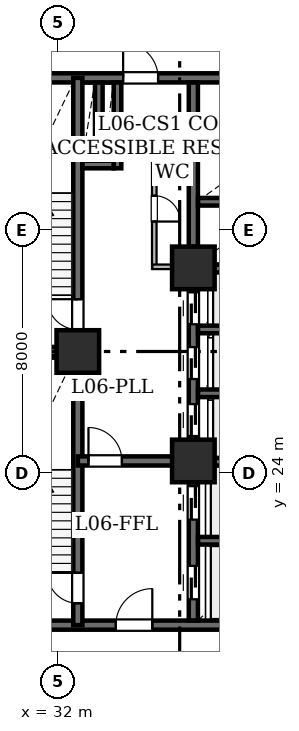
"""IFC4 building model, lengths in metres.
Left out: names, types, materials, properties, quantities, classifications, styles, units other than length and angle.
Written with IfcOpenShell. Run it as: python <this file> out.ifc"""

import sys

from ifc_helpers import new_model, si_unit, direction, frame, frame_2d, origin, origin_2d, place, context, subcontext, project, spatial, rectangle, hollow_rectangle, extrude, element, fill, save


model = new_model("IFC4")
c1 = context("Model", 3, precision=1e-05, world=origin(), true_north=direction((0.0, 1.0)))
c2 = subcontext(c1, "Body", "Model", "MODEL_VIEW")
j1 = project(units=[si_unit("LENGTHUNIT", "METRE"), si_unit("PLANEANGLEUNIT", "RADIAN")], contexts=[c1])
p1 = place(None, origin())
s1 = spatial("IfcSite", under=j1, at=p1, CompositionType="ELEMENT")
p2 = place(p1, origin())
s2 = spatial("IfcBuilding", under=s1, at=p2, CompositionType="ELEMENT")
p3 = place(p2, frame((0.0, 0.0, 28.8)))
s3 = spatial("IfcBuildingStorey", under=s2, at=p3, CompositionType="ELEMENT", Elevation=28.8)
for number, where, z_axis, x_axis in (
    (1, (32.65, 28.0, 0.0), (0.0, 0.0, 1.0), (1.0, 0.0, 0.0)),
    (2, (36.45, 24.4, 0.0), (0.0, 0.0, 1.0), (1.0, 0.0, 0.0)),
    (3, (36.45, 30.75, 0.0), (0.0, 0.0, 1.0), (1.0, 0.0, 0.0)),
):
    element("IfcColumn", number, at=place(p3, frame(where, z_axis=z_axis, x_axis=x_axis)), inside=s3, PredefinedType="COLUMN", context=c2, shape_type="SweptSolid", body=[
        extrude(hollow_rectangle(XDim=1.4, YDim=1.4, WallThickness=0.07, at=origin_2d()), origin(), (0.0, 0.0, 1.0), 4.5),
    ])
p4 = place(p3, frame((29.0, 19.0, 0.0), z_axis=(0.0, 0.0, 1.0), x_axis=(1.0, 0.0, 0.0)))
e4 = element("IfcWall", 4, at=p4, inside=s3, PredefinedType="SHEAR", context=c2, shape_type="SweptSolid", body=[
    extrude(rectangle(XDim=10.4, YDim=0.3, at=frame_2d((5.2, 0.0))), origin(), (0.0, 0.0, 1.0), 4.08),
])
p5 = place(p4, frame((4.9, 0.0, 0.0)))
e5 = element("IfcOpeningElement", 5, at=p5, cuts=e4, PredefinedType="OPENING", context=c2, shape_type="SweptSolid", body=[
    extrude(rectangle(XDim=1.2, YDim=2.15, at=frame_2d((0.6, 1.075))), frame((0.0, 0.16, 0.0), z_axis=(0.0, -1.0, 0.0), x_axis=(1.0, 0.0, 0.0)), (0.0, 0.0, 1.0), 0.32),
])
p6 = place(p3, frame((29.0, 37.0, 0.0), z_axis=(0.0, 0.0, 1.0), x_axis=(1.0, 0.0, 0.0)))
e6 = element("IfcWall", 6, at=p6, inside=s3, PredefinedType="SHEAR", context=c2, shape_type="SweptSolid", body=[
    extrude(rectangle(XDim=10.4, YDim=0.3, at=frame_2d((5.2, 0.0))), origin(), (0.0, 0.0, 1.0), 4.08),
])
p7 = place(p6, frame((5.14, 0.0, 0.0)))
e7 = element("IfcOpeningElement", 7, at=p7, cuts=e6, PredefinedType="OPENING", context=c2, shape_type="SweptSolid", body=[
    extrude(rectangle(XDim=1.15, YDim=2.2, at=frame_2d((0.575, 1.1))), frame((0.0, 0.16, 0.0), z_axis=(0.0, -1.0, 0.0), x_axis=(1.0, 0.0, 0.0)), (0.0, 0.0, 1.0), 0.32),
])
p8 = place(p3, frame((32.65, 19.0, 0.0), z_axis=(0.0, 0.0, 1.0), x_axis=(0.0, 1.0, 0.0)))
e8 = element("IfcWall", 8, at=p8, inside=s3, PredefinedType="SHEAR", context=c2, shape_type="SweptSolid", body=[
    extrude(rectangle(XDim=9.0, YDim=0.3, at=frame_2d((4.5, 0.0))), origin(), (0.0, 0.0, 1.0), 4.08),
])
p9 = place(p8, frame((0.72, 0.0, 0.0)))
e9 = element("IfcOpeningElement", 9, at=p9, cuts=e8, PredefinedType="OPENING", context=c2, shape_type="SweptSolid", body=[
    extrude(rectangle(XDim=1.0, YDim=2.15, at=frame_2d((0.5, 1.075))), frame((0.0, 0.16, 0.0), z_axis=(0.0, -1.0, 0.0), x_axis=(1.0, 0.0, 0.0)), (0.0, 0.0, 1.0), 0.32),
])
p10 = place(p3, frame((32.65, 28.0, 0.0), z_axis=(0.0, 0.0, 1.0), x_axis=(0.0, 1.0, 0.0)))
e10 = element("IfcWall", 10, at=p10, inside=s3, PredefinedType="SHEAR", context=c2, shape_type="SweptSolid", body=[
    extrude(rectangle(XDim=9.0, YDim=0.3, at=frame_2d((4.5, 0.0))), origin(), (0.0, 0.0, 1.0), 4.08),
])
p11 = place(p10, frame((0.72, 0.0, 0.0)))
e11 = element("IfcOpeningElement", 11, at=p11, cuts=e10, PredefinedType="OPENING", context=c2, shape_type="SweptSolid", body=[
    extrude(rectangle(XDim=1.0, YDim=2.15, at=frame_2d((0.5, 1.075))), frame((0.0, 0.16, 0.0), z_axis=(0.0, -1.0, 0.0), x_axis=(1.0, 0.0, 0.0)), (0.0, 0.0, 1.0), 0.32),
])
p12 = place(p3, frame((29.0, 28.0, 0.0), z_axis=(0.0, 0.0, 1.0), x_axis=(1.0, 0.0, 0.0)))
e12 = element("IfcWall", 12, at=p12, inside=s3, PredefinedType="SHEAR", context=c2, shape_type="SweptSolid", body=[
    extrude(rectangle(XDim=3.65, YDim=0.3, at=frame_2d((1.825, 0.0))), origin(), (0.0, 0.0, 1.0), 4.08),
])
p13 = place(p3, frame((32.65, 24.4, 0.0), z_axis=(0.0, 0.0, 1.0), x_axis=(1.0, 0.0, 0.0)))
e13 = element("IfcWall", 13, at=p13, inside=s3, PredefinedType="SHEAR", context=c2, shape_type="SweptSolid", body=[
    extrude(rectangle(XDim=3.8, YDim=0.3, at=frame_2d((1.9, 0.0))), origin(), (0.0, 0.0, 1.0), 4.08),
])
p14 = place(p13, frame((0.35, 0.0, 0.0)))
e14 = element("IfcOpeningElement", 14, at=p14, cuts=e13, PredefinedType="OPENING", context=c2, shape_type="SweptSolid", body=[
    extrude(rectangle(XDim=1.1, YDim=2.15, at=frame_2d((0.55, 1.075))), frame((0.0, 0.16, 0.0), z_axis=(0.0, -1.0, 0.0), x_axis=(1.0, 0.0, 0.0)), (0.0, 0.0, 1.0), 0.32),
])
p15 = place(p3, frame((36.45, 19.154, 0.0), z_axis=(0.0, 0.0, 1.0), x_axis=(0.0, 1.0, 0.0)))
e15 = element("IfcWall", 15, at=p15, inside=s3, PredefinedType="SHEAR", context=c2, shape_type="SweptSolid", body=[
    extrude(rectangle(XDim=4.546, YDim=0.3, at=frame_2d((2.273, 0.0))), origin(), (0.0, 0.0, 1.0), 4.08),
])
p16 = place(p15, frame((0.696, 0.0, 0.0)))
e16 = element("IfcOpeningElement", 16, at=p16, cuts=e15, PredefinedType="OPENING", context=c2, shape_type="SweptSolid", body=[
    extrude(rectangle(XDim=1.1, YDim=2.15, at=frame_2d((0.55, 1.075))), frame((0.0, 0.16, 0.0), z_axis=(0.0, -1.0, 0.0), x_axis=(1.0, 0.0, 0.0)), (0.0, 0.0, 1.0), 0.32),
])
p17 = place(p15, frame((3.316, 0.0, 0.0)))
e17 = element("IfcOpeningElement", 17, at=p17, cuts=e15, PredefinedType="OPENING", context=c2, shape_type="SweptSolid", body=[
    extrude(rectangle(XDim=1.1, YDim=2.15, at=frame_2d((0.55, 1.075))), frame((0.0, 0.16, 0.0), z_axis=(0.0, -1.0, 0.0), x_axis=(1.0, 0.0, 0.0)), (0.0, 0.0, 1.0), 0.32),
])
p18 = place(p3, frame((36.45, 25.1, 0.0), z_axis=(0.0, 0.0, 1.0), x_axis=(0.0, 1.0, 0.0)))
e18 = element("IfcWall", 18, at=p18, inside=s3, PredefinedType="SHEAR", context=c2, shape_type="SweptSolid", body=[
    extrude(rectangle(XDim=4.95, YDim=0.3, at=frame_2d((2.475, 0.0))), origin(), (0.0, 0.0, 1.0), 4.08),
])
p19 = place(p18, frame((0.12, 0.0, 0.0)))
e19 = element("IfcOpeningElement", 19, at=p19, cuts=e18, PredefinedType="OPENING", context=c2, shape_type="SweptSolid", body=[
    extrude(rectangle(XDim=1.05, YDim=2.15, at=frame_2d((0.525, 1.075))), frame((0.0, 0.16, 0.0), z_axis=(0.0, -1.0, 0.0), x_axis=(1.0, 0.0, 0.0)), (0.0, 0.0, 1.0), 0.32),
])
p20 = place(p18, frame((1.995, 0.0, 0.0)))
e20 = element("IfcOpeningElement", 20, at=p20, cuts=e18, PredefinedType="OPENING", context=c2, shape_type="SweptSolid", body=[
    extrude(rectangle(XDim=1.05, YDim=2.15, at=frame_2d((0.525, 1.075))), frame((0.0, 0.16, 0.0), z_axis=(0.0, -1.0, 0.0), x_axis=(1.0, 0.0, 0.0)), (0.0, 0.0, 1.0), 0.32),
])
p21 = place(p18, frame((3.795, 0.0, 0.0)))
e21 = element("IfcOpeningElement", 21, at=p21, cuts=e18, PredefinedType="OPENING", context=c2, shape_type="SweptSolid", body=[
    extrude(rectangle(XDim=1.05, YDim=2.15, at=frame_2d((0.525, 1.075))), frame((0.0, 0.16, 0.0), z_axis=(0.0, -1.0, 0.0), x_axis=(1.0, 0.0, 0.0)), (0.0, 0.0, 1.0), 0.32),
])
p22 = place(p3, frame((36.45, 31.45, 0.0), z_axis=(0.0, 0.0, 1.0), x_axis=(0.0, 1.0, 0.0)))
e22 = element("IfcWall", 22, at=p22, inside=s3, PredefinedType="SHEAR", context=c2, shape_type="SweptSolid", body=[
    extrude(rectangle(XDim=5.396, YDim=0.3, at=frame_2d((2.698, 0.0))), origin(), (0.0, 0.0, 1.0), 4.08),
])
for number, where, z_axis, x_axis in (
    (23, (36.604, 21.775, 0.0), (0.0, 0.0, 1.0), (1.0, 0.0, 0.0)),
    (24, (36.604, 24.375, 0.0), (0.0, 0.0, 1.0), (1.0, 0.0, 0.0)),
    (25, (36.604, 26.625, 0.0), (0.0, 0.0, 1.0), (1.0, 0.0, 0.0)),
    (26, (36.604, 28.725, 0.0), (0.0, 0.0, 1.0), (1.0, 0.0, 0.0)),
    (27, (36.604, 30.725, 0.0), (0.0, 0.0, 1.0), (1.0, 0.0, 0.0)),
    (28, (36.604, 32.925, 0.0), (0.0, 0.0, 1.0), (1.0, 0.0, 0.0)),
    (29, (36.604, 34.975, 0.0), (0.0, 0.0, 1.0), (1.0, 0.0, 0.0)),
):
    element("IfcWall", number, at=place(p3, frame(where, z_axis=z_axis, x_axis=x_axis)), inside=s3, PredefinedType="SHEAR", context=c2, shape_type="SweptSolid", body=[
        extrude(rectangle(XDim=2.642, YDim=0.25, at=frame_2d((1.321, 0.0))), origin(), (0.0, 0.0, 1.0), 4.08),
    ])
p23 = place(p3, frame((33.955, 34.025, 0.0), z_axis=(0.0, 0.0, 1.0), x_axis=(0.0, 1.0, 0.0)))
e30 = element("IfcWall", 30, at=p23, inside=s3, PredefinedType="SHEAR", context=c2, shape_type="SweptSolid", body=[
    extrude(rectangle(XDim=2.821, YDim=0.25, at=frame_2d((1.411, 0.0))), origin(), (0.0, 0.0, 1.0), 4.08),
])
p24 = place(p3, frame((32.804, 34.15, 0.0), z_axis=(0.0, 0.0, 1.0), x_axis=(1.0, 0.0, 0.0)))
e31 = element("IfcWall", 31, at=p24, inside=s3, PredefinedType="SHEAR", context=c2, shape_type="SweptSolid", body=[
    extrude(rectangle(XDim=1.022, YDim=0.25, at=frame_2d((0.511, 0.0))), origin(), (0.0, 0.0, 1.0), 4.08),
])
p25 = place(p3, frame((33.34, 34.279, 0.0), z_axis=(0.0, 0.0, 1.0), x_axis=(0.0, 1.0, 0.0)))
e32 = element("IfcWall", 32, at=p25, inside=s3, PredefinedType="SHEAR", context=c2, shape_type="SweptSolid", body=[
    extrude(rectangle(XDim=2.567, YDim=0.25, at=frame_2d((1.283, 0.0))), origin(), (0.0, 0.0, 1.0), 4.08),
])
p26 = place(p3, frame((36.306, 34.615, 0.0), z_axis=(0.0, 0.0, 1.0), x_axis=(-1.0, 0.0, 0.0)))
e33 = element("IfcWall", 33, at=p26, inside=s3, PredefinedType="STANDARD", context=c2, shape_type="SweptSolid", body=[
    extrude(rectangle(XDim=1.206, YDim=0.15, at=frame_2d((0.603, 0.0))), origin(), (0.0, 0.0, 1.0), 4.08),
])
p27 = place(p3, frame((35.165, 34.678, 0.0), z_axis=(0.0, 0.0, 1.0), x_axis=(0.0, -1.0, 0.0)))
e34 = element("IfcWall", 34, at=p27, inside=s3, PredefinedType="STANDARD", context=c2, shape_type="SweptSolid", body=[
    extrude(rectangle(XDim=3.958, YDim=0.15, at=frame_2d((1.979, 0.0))), origin(), (0.0, 0.0, 1.0), 4.08),
])
p28 = place(p27, frame((1.554, 0.0, 0.0)))
e35 = element("IfcOpeningElement", 35, at=p28, cuts=e34, PredefinedType="OPENING", context=c2, shape_type="SweptSolid", body=[
    extrude(rectangle(XDim=0.85, YDim=2.1, at=frame_2d((0.425, 1.05))), frame((0.0, 0.085, 0.0), z_axis=(0.0, -1.0, 0.0), x_axis=(1.0, 0.0, 0.0)), (0.0, 0.0, 1.0), 0.17),
])
p29 = place(p3, frame((35.102, 30.785, 0.0), z_axis=(0.0, 0.0, 1.0), x_axis=(1.0, 0.0, 0.0)))
e36 = element("IfcWall", 36, at=p29, inside=s3, PredefinedType="STANDARD", context=c2, shape_type="SweptSolid", body=[
    extrude(rectangle(XDim=1.198, YDim=0.15, at=frame_2d((0.599, 0.0))), origin(), (0.0, 0.0, 1.0), 4.08),
])
p30 = place(p9, origin())
e37 = element("IfcDoor", 37, at=p30, inside=s3, OperationType="SINGLE_SWING_RIGHT", PredefinedType="DOOR", context=c2, shape_type="SweptSolid", body=[
    extrude(rectangle(XDim=1.0, YDim=2.15, at=frame_2d((0.5, 1.075))), frame((0.0, 0.025, 0.0), z_axis=(0.0, -1.0, 0.0), x_axis=(1.0, 0.0, 0.0)), (0.0, 0.0, 1.0), 0.05),
])
fill(e9, e37)
p31 = place(p11, origin())
e38 = element("IfcDoor", 38, at=p31, inside=s3, OperationType="SINGLE_SWING_RIGHT", PredefinedType="DOOR", context=c2, shape_type="SweptSolid", body=[
    extrude(rectangle(XDim=1.0, YDim=2.15, at=frame_2d((0.5, 1.075))), frame((0.0, 0.025, 0.0), z_axis=(0.0, -1.0, 0.0), x_axis=(1.0, 0.0, 0.0)), (0.0, 0.0, 1.0), 0.05),
])
fill(e11, e38)
p32 = place(p14, origin())
e39 = element("IfcDoor", 39, at=p32, inside=s3, OperationType="SINGLE_SWING_LEFT", PredefinedType="DOOR", context=c2, shape_type="SweptSolid", body=[
    extrude(rectangle(XDim=1.1, YDim=2.15, at=frame_2d((0.55, 1.075))), frame((0.0, 0.025, 0.0), z_axis=(0.0, -1.0, 0.0), x_axis=(1.0, 0.0, 0.0)), (0.0, 0.0, 1.0), 0.05),
])
fill(e14, e39)
p33 = place(p5, origin())
e40 = element("IfcDoor", 40, at=p33, inside=s3, OperationType="SINGLE_SWING_RIGHT", PredefinedType="DOOR", context=c2, shape_type="SweptSolid", body=[
    extrude(rectangle(XDim=1.2, YDim=2.15, at=frame_2d((0.6, 1.075))), frame((0.0, 0.025, 0.0), z_axis=(0.0, -1.0, 0.0), x_axis=(1.0, 0.0, 0.0)), (0.0, 0.0, 1.0), 0.05),
])
fill(e5, e40)
p34 = place(p7, origin())
e41 = element("IfcDoor", 41, at=p34, inside=s3, OperationType="SINGLE_SWING_LEFT", PredefinedType="DOOR", context=c2, shape_type="SweptSolid", body=[
    extrude(rectangle(XDim=1.15, YDim=2.2, at=frame_2d((0.575, 1.1))), frame((0.0, 0.025, 0.0), z_axis=(0.0, -1.0, 0.0), x_axis=(1.0, 0.0, 0.0)), (0.0, 0.0, 1.0), 0.05),
])
fill(e7, e41)
p35 = place(p16, origin())
e42 = element("IfcDoor", 42, at=p35, inside=s3, OperationType="SLIDING_TO_LEFT", PredefinedType="DOOR", context=c2, shape_type="SweptSolid", body=[
    extrude(rectangle(XDim=1.1, YDim=2.15, at=frame_2d((0.55, 1.075))), frame((0.0, 0.025, 0.0), z_axis=(0.0, -1.0, 0.0), x_axis=(1.0, 0.0, 0.0)), (0.0, 0.0, 1.0), 0.05),
])
fill(e16, e42)
p36 = place(p17, origin())
e43 = element("IfcDoor", 43, at=p36, inside=s3, OperationType="SLIDING_TO_LEFT", PredefinedType="DOOR", context=c2, shape_type="SweptSolid", body=[
    extrude(rectangle(XDim=1.1, YDim=2.15, at=frame_2d((0.55, 1.075))), frame((0.0, 0.025, 0.0), z_axis=(0.0, -1.0, 0.0), x_axis=(1.0, 0.0, 0.0)), (0.0, 0.0, 1.0), 0.05),
])
fill(e17, e43)
p37 = place(p19, origin())
e44 = element("IfcDoor", 44, at=p37, inside=s3, OperationType="SLIDING_TO_LEFT", PredefinedType="DOOR", context=c2, shape_type="SweptSolid", body=[
    extrude(rectangle(XDim=1.05, YDim=2.15, at=frame_2d((0.525, 1.075))), frame((0.0, 0.025, 0.0), z_axis=(0.0, -1.0, 0.0), x_axis=(1.0, 0.0, 0.0)), (0.0, 0.0, 1.0), 0.05),
])
fill(e19, e44)
p38 = place(p20, origin())
e45 = element("IfcDoor", 45, at=p38, inside=s3, OperationType="SLIDING_TO_LEFT", PredefinedType="DOOR", context=c2, shape_type="SweptSolid", body=[
    extrude(rectangle(XDim=1.05, YDim=2.15, at=frame_2d((0.525, 1.075))), frame((0.0, 0.025, 0.0), z_axis=(0.0, -1.0, 0.0), x_axis=(1.0, 0.0, 0.0)), (0.0, 0.0, 1.0), 0.05),
])
fill(e20, e45)
p39 = place(p21, origin())
e46 = element("IfcDoor", 46, at=p39, inside=s3, OperationType="SLIDING_TO_LEFT", PredefinedType="DOOR", context=c2, shape_type="SweptSolid", body=[
    extrude(rectangle(XDim=1.05, YDim=2.15, at=frame_2d((0.525, 1.075))), frame((0.0, 0.025, 0.0), z_axis=(0.0, -1.0, 0.0), x_axis=(1.0, 0.0, 0.0)), (0.0, 0.0, 1.0), 0.05),
])
fill(e21, e46)
p40 = place(p28, origin())
e47 = element("IfcDoor", 47, at=p40, inside=s3, OperationType="SINGLE_SWING_RIGHT", PredefinedType="DOOR", context=c2, shape_type="SweptSolid", body=[
    extrude(rectangle(XDim=0.85, YDim=2.1, at=frame_2d((0.425, 1.05))), frame((0.0, 0.025, 0.0), z_axis=(0.0, -1.0, 0.0), x_axis=(1.0, 0.0, 0.0)), (0.0, 0.0, 1.0), 0.05),
])
fill(e35, e47)
save(model, sys.argv[1])
